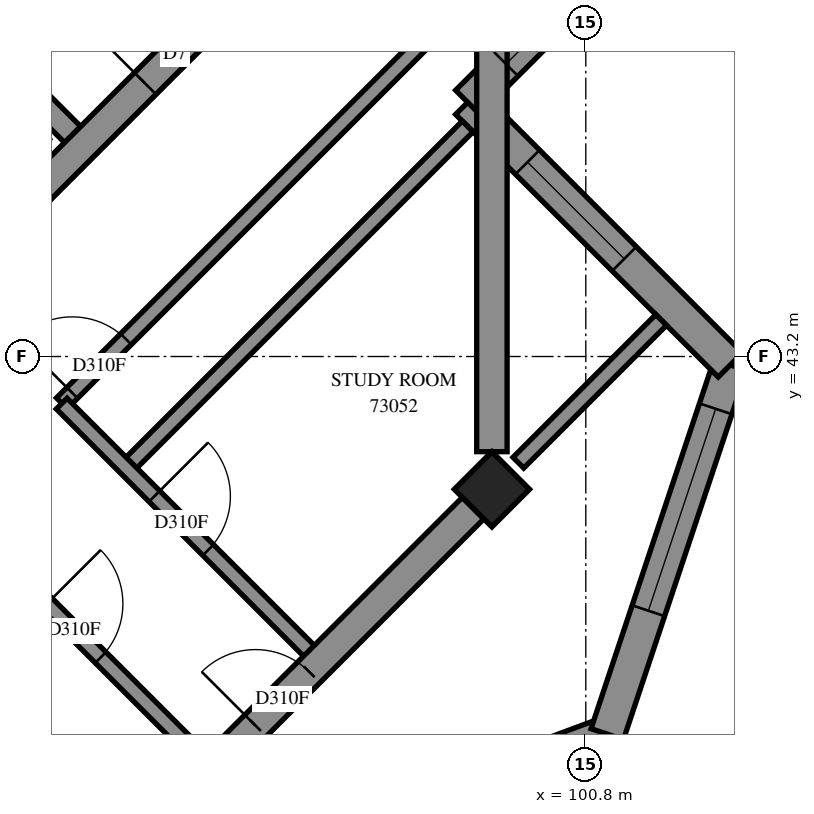
"""IFC4 building model, lengths in metres.
Left out: names, types, materials, properties, quantities, classifications, styles, units other than length and angle.
Written with IfcOpenShell. Run it as: python <this file> out.ifc"""

import sys

from ifc_helpers import new_model, si_unit, direction, frame, frame_2d, origin, origin_2d, place, context, subcontext, project, spatial, polyline, rectangle, outline, extrude, element, fill, save


model = new_model("IFC4")
c1 = context("Model", 3, precision=1e-05, world=origin(), true_north=direction((0.0, 1.0)))
c2 = subcontext(c1, "Body", "Model", "MODEL_VIEW")
j1 = project(units=[si_unit("LENGTHUNIT", "METRE"), si_unit("PLANEANGLEUNIT", "RADIAN")], contexts=[c1])
p1 = place(None, origin())
s1 = spatial("IfcSite", under=j1, at=p1, CompositionType="ELEMENT")
p2 = place(p1, origin())
s2 = spatial("IfcBuilding", under=s1, at=p2, CompositionType="ELEMENT")
p3 = place(p2, frame((0.0, 0.0, 267.6)))
s3 = spatial("IfcBuildingStorey", under=s2, at=p3, CompositionType="ELEMENT", Elevation=267.6)
p4 = place(p3, frame((99.565, 41.453, 0.0), z_axis=(0.0, 0.0, 1.0), x_axis=(0.7071067812, -0.7071067812, 0.0)))
e1 = element("IfcColumn", 1, at=p4, inside=s3, PredefinedType="COLUMN", context=c2, shape_type="SweptSolid", body=[
    extrude(rectangle(XDim=0.7, YDim=0.7, at=origin_2d()), origin(), (0.0, 0.0, 1.0), 3.1),
])
p5 = place(p3, frame((86.978, 38.766, -0.3), z_axis=(0.0, 0.0, 1.0), x_axis=(0.7071067812, 0.7071067812, 0.0)))
e2 = element("IfcWall", 2, at=p5, inside=s3, PredefinedType="SHEAR", context=c2, shape_type="SweptSolid", body=[
    extrude(rectangle(XDim=14.4, YDim=0.4, at=frame_2d((7.2, 0.0))), origin(), (0.0, 0.0, 1.0), 2.7),
])
p6 = place(p5, frame((4.55, 0.0, 0.3)))
e3 = element("IfcOpeningElement", 3, at=p6, cuts=e2, PredefinedType="OPENING", context=c2, shape_type="SweptSolid", body=[
    extrude(rectangle(XDim=1.1, YDim=2.1, at=frame_2d((0.55, 1.05))), frame((0.0, 0.21, 0.0), z_axis=(0.0, -1.0, 0.0), x_axis=(1.0, 0.0, 0.0)), (0.0, 0.0, 1.0), 0.42),
])
p7 = place(p5, frame((11.35, 0.0, 0.3)))
e4 = element("IfcOpeningElement", 4, at=p7, cuts=e2, PredefinedType="OPENING", context=c2, shape_type="SweptSolid", body=[
    extrude(rectangle(XDim=1.1, YDim=2.1, at=frame_2d((0.55, 1.05))), frame((0.0, 0.21, 0.0), z_axis=(0.0, -1.0, 0.0), x_axis=(1.0, 0.0, 0.0)), (0.0, 0.0, 1.0), 0.42),
])
p8 = place(p3, frame((88.958, 51.211, 0.0), z_axis=(0.0, 0.0, 1.0), x_axis=(0.7070998367, -0.7071137256, 0.0)))
e5 = element("IfcWall", 5, at=p8, inside=s3, PredefinedType="SOLIDWALL", context=c2, shape_type="SweptSolid", body=[
    extrude(rectangle(XDim=7.2, YDim=0.3, at=frame_2d((3.6, 0.0))), origin(), (0.0, 0.0, 1.0), 3.1),
])
p9 = place(p3, frame((96.137, 36.395, 0.0), z_axis=(0.0, 0.0, 1.0), x_axis=(0.937429161, 0.3481760591, 0.0)))
e6 = element("IfcWall", 6, at=p9, inside=s3, PredefinedType="SOLIDWALL", context=c2, shape_type="SweptSolid", body=[
    extrude(outline(polyline([(0.103, -0.225), (5.383, -0.225), (5.168, 0.225), (-0.103, 0.225), (0.103, -0.225)])), origin(), (0.0, 0.0, 1.0), 3.1),
])
p10 = place(p9, frame((1.651, 0.0, 0.45)))
e7 = element("IfcOpeningElement", 7, at=p10, cuts=e6, PredefinedType="OPENING", context=c2, shape_type="SweptSolid", body=[
    extrude(rectangle(XDim=2.8, YDim=2.55, at=frame_2d((1.4, 1.275))), frame((0.0, 0.235, 0.0), z_axis=(0.0, -1.0, 0.0), x_axis=(1.0, 0.0, 0.0)), (0.0, 0.0, 1.0), 0.47),
])
p11 = place(p3, frame((101.082, 38.232, 0.0), z_axis=(0.0, 0.0, 1.0), x_axis=(0.316227766, 0.9486832981, 0.0)))
e8 = element("IfcWall", 8, at=p11, inside=s3, PredefinedType="SOLIDWALL", context=c2, shape_type="SweptSolid", body=[
    extrude(outline(polyline([(-0.108, -0.225), (5.259, -0.225), (4.981, 0.225), (0.108, 0.225), (-0.108, -0.225)])), origin(), (0.0, 0.0, 1.0), 3.1),
])
p12 = place(p11, frame((1.711, 0.0, 0.45)))
e9 = element("IfcOpeningElement", 9, at=p12, cuts=e8, PredefinedType="OPENING", context=c2, shape_type="SweptSolid", body=[
    extrude(rectangle(XDim=2.8, YDim=2.55, at=frame_2d((1.4, 1.275))), frame((0.0, 0.235, 0.0), z_axis=(0.0, -1.0, 0.0), x_axis=(1.0, 0.0, 0.0)), (0.0, 0.0, 1.0), 0.47),
])
p13 = place(p3, frame((102.701, 43.089, 0.0), z_axis=(0.0, 0.0, 1.0), x_axis=(-0.7070965479, 0.7071170144, 0.0)))
e10 = element("IfcWall", 10, at=p13, inside=s3, PredefinedType="SOLIDWALL", context=c2, shape_type="SweptSolid", body=[
    extrude(outline(polyline([(-0.139, -0.225), (4.661, -0.225), (5.111, 0.225), (0.139, 0.225), (-0.139, -0.225)])), origin(), (0.0, 0.0, 1.0), 3.1),
])
p14 = place(p13, frame((1.974, 0.0, 0.6)))
e11 = element("IfcOpeningElement", 11, at=p14, cuts=e10, PredefinedType="OPENING", context=c2, shape_type="SweptSolid", body=[
    extrude(rectangle(XDim=1.8, YDim=1.9, at=frame_2d((0.9, 0.95))), frame((0.0, 0.235, 0.0), z_axis=(0.0, -1.0, 0.0), x_axis=(1.0, 0.0, 0.0)), (0.0, 0.0, 1.0), 0.47),
])
p15 = place(p3, frame((99.246, 46.544, 0.0), z_axis=(0.0, 0.0, 1.0), x_axis=(0.7071067812, 0.7071067812, 0.0)))
e12 = element("IfcWall", 12, at=p15, inside=s3, PredefinedType="SOLIDWALL", context=c2, shape_type="SweptSolid", body=[
    extrude(outline(polyline([(0.225, -0.225), (6.137, -0.225), (5.513, 0.225), (-0.225, 0.225), (0.225, -0.225)])), origin(), (0.0, 0.0, 1.0), 3.1),
])
p16 = place(p15, frame((0.713, 0.0, 0.6)))
e13 = element("IfcOpeningElement", 13, at=p16, cuts=e12, PredefinedType="OPENING", context=c2, shape_type="SweptSolid", body=[
    extrude(rectangle(XDim=1.8, YDim=1.9, at=frame_2d((0.9, 0.95))), frame((0.0, 0.235, 0.0), z_axis=(0.0, -1.0, 0.0), x_axis=(1.0, 0.0, 0.0)), (0.0, 0.0, 1.0), 0.47),
])
p17 = place(p15, frame((3.969, 0.0, 0.6)))
e14 = element("IfcOpeningElement", 14, at=p17, cuts=e12, PredefinedType="OPENING", context=c2, shape_type="SweptSolid", body=[
    extrude(rectangle(XDim=1.2, YDim=1.9, at=frame_2d((0.6, 0.95))), frame((0.0, 0.235, 0.0), z_axis=(0.0, -1.0, 0.0), x_axis=(1.0, 0.0, 0.0)), (0.0, 0.0, 1.0), 0.47),
])
p18 = place(p3, frame((93.907, 42.585, 0.0), z_axis=(0.0, 0.0, 1.0), x_axis=(0.7071067812, 0.7071067812, 0.0)))
e15 = element("IfcWall", 15, at=p18, inside=s3, PredefinedType="PARTITIONING", context=c2, shape_type="SweptSolid", body=[
    extrude(rectangle(XDim=9.201, YDim=0.2, at=frame_2d((4.601, 0.0))), origin(), (0.0, 0.0, 1.0), 3.1),
])
p19 = place(p18, frame((0.193, 0.0, 0.0)))
e16 = element("IfcOpeningElement", 16, at=p19, cuts=e15, PredefinedType="OPENING", context=c2, shape_type="SweptSolid", body=[
    extrude(rectangle(XDim=1.0, YDim=2.1, at=frame_2d((0.5, 1.05))), frame((0.0, 0.11, 0.0), z_axis=(0.0, -1.0, 0.0), x_axis=(1.0, 0.0, 0.0)), (0.0, 0.0, 1.0), 0.22),
])
p20 = place(p3, frame((94.755, 41.737, 0.0), z_axis=(0.0, 0.0, 1.0), x_axis=(0.7071146549, 0.7070989073, 0.0)))
e17 = element("IfcWall", 17, at=p20, inside=s3, PredefinedType="PARTITIONING", context=c2, shape_type="SweptSolid", body=[
    extrude(rectangle(XDim=6.35, YDim=0.2, at=frame_2d((3.175, 0.0))), origin(), (0.0, 0.0, 1.0), 3.1),
])
p21 = place(p3, frame((93.905, 42.581, 0.0), z_axis=(0.0, 0.0, 1.0), x_axis=(0.7071067812, -0.7071067812, 0.0)))
e18 = element("IfcWall", 18, at=p21, inside=s3, PredefinedType="PARTITIONING", context=c2, shape_type="SweptSolid", body=[
    extrude(rectangle(XDim=4.8, YDim=0.2, at=frame_2d((2.4, 0.0))), origin(), (0.0, 0.0, 1.0), 3.1),
])
p22 = place(p21, frame((1.725, 0.0, 0.0)))
e19 = element("IfcOpeningElement", 19, at=p22, cuts=e18, PredefinedType="OPENING", context=c2, shape_type="SweptSolid", body=[
    extrude(rectangle(XDim=1.0, YDim=2.1, at=frame_2d((0.5, 1.05))), frame((0.0, 0.11, 0.0), z_axis=(0.0, -1.0, 0.0), x_axis=(1.0, 0.0, 0.0)), (0.0, 0.0, 1.0), 0.22),
])
p23 = place(p3, frame((92.491, 41.167, 0.0), z_axis=(0.0, 0.0, 1.0), x_axis=(0.7071067812, -0.7071067812, 0.0)))
e20 = element("IfcWall", 20, at=p23, inside=s3, PredefinedType="PARTITIONING", context=c2, shape_type="SweptSolid", body=[
    extrude(rectangle(XDim=4.8, YDim=0.2, at=frame_2d((2.4, 0.0))), origin(), (0.0, 0.0, 1.0), 3.1),
])
p24 = place(p23, frame((1.725, 0.0, 0.0)))
e21 = element("IfcOpeningElement", 21, at=p24, cuts=e20, PredefinedType="OPENING", context=c2, shape_type="SweptSolid", body=[
    extrude(rectangle(XDim=1.0, YDim=2.1, at=frame_2d((0.5, 1.05))), frame((0.0, 0.11, 0.0), z_axis=(0.0, -1.0, 0.0), x_axis=(1.0, 0.0, 0.0)), (0.0, 0.0, 1.0), 0.22),
])
p25 = place(p3, frame((97.301, 39.191, 0.0), z_axis=(0.0, 0.0, 1.0), x_axis=(0.7071067812, 0.7071067812, 0.0)))
e22 = element("IfcWall", 22, at=p25, inside=s3, PredefinedType="PARTITIONING", context=c2, shape_type="SweptSolid", body=[
    extrude(rectangle(XDim=2.707, YDim=0.2, at=frame_2d((1.353, 0.0))), origin(), (0.0, 0.0, 1.0), 2.6),
])
p26 = place(p3, frame((99.913, 41.803, 0.0), z_axis=(0.0, 0.0, 1.0), x_axis=(0.7071067812, 0.7071067812, 0.0)))
e23 = element("IfcWall", 23, at=p26, inside=s3, PredefinedType="PARTITIONING", context=c2, shape_type="SweptSolid", body=[
    extrude(rectangle(XDim=2.656, YDim=0.2, at=frame_2d((1.328, 0.0))), origin(), (0.0, 0.0, 1.0), 3.1),
])
p27 = place(p3, frame((95.887, 37.777, 0.0), z_axis=(0.0, 0.0, 1.0), x_axis=(0.7071067812, 0.7071067812, 0.0)))
e24 = element("IfcWall", 24, at=p27, inside=s3, PredefinedType="PARTITIONING", context=c2, shape_type="SweptSolid", body=[
    extrude(rectangle(XDim=2.0, YDim=0.2, at=frame_2d((1.0, 0.0))), origin(), (0.0, 0.0, 1.0), 2.6),
])
p28 = place(p27, frame((0.803, 0.0, 0.0)))
e25 = element("IfcOpeningElement", 25, at=p28, cuts=e24, PredefinedType="OPENING", context=c2, shape_type="SweptSolid", body=[
    extrude(rectangle(XDim=1.0, YDim=2.1, at=frame_2d((0.5, 1.05))), frame((0.0, 0.11, 0.0), z_axis=(0.0, -1.0, 0.0), x_axis=(1.0, 0.0, 0.0)), (0.0, 0.0, 1.0), 0.22),
])
p29 = place(p12, origin())
e26 = element("IfcWindow", 26, at=p29, inside=s3, PartitioningType="SINGLE_PANEL", PredefinedType="WINDOW", context=c2, shape_type="SweptSolid", body=[
    extrude(rectangle(XDim=2.8, YDim=2.55, at=frame_2d((1.4, 1.275))), frame((0.0, 0.205, 0.0), z_axis=(0.0, -1.0, 0.0), x_axis=(1.0, 0.0, 0.0)), (0.0, 0.0, 1.0), 0.06),
])
fill(e9, e26)
p30 = place(p14, origin())
e27 = element("IfcWindow", 27, at=p30, inside=s3, PartitioningType="SINGLE_PANEL", PredefinedType="WINDOW", context=c2, shape_type="SweptSolid", body=[
    extrude(rectangle(XDim=1.8, YDim=1.9, at=frame_2d((0.9, 0.95))), frame((0.0, 0.205, 0.0), z_axis=(0.0, -1.0, 0.0), x_axis=(1.0, 0.0, 0.0)), (0.0, 0.0, 1.0), 0.06),
])
fill(e11, e27)
p31 = place(p16, origin())
e28 = element("IfcWindow", 28, at=p31, inside=s3, PartitioningType="SINGLE_PANEL", PredefinedType="WINDOW", context=c2, shape_type="SweptSolid", body=[
    extrude(rectangle(XDim=1.8, YDim=1.9, at=frame_2d((0.9, 0.95))), frame((0.0, 0.205, 0.0), z_axis=(0.0, -1.0, 0.0), x_axis=(1.0, 0.0, 0.0)), (0.0, 0.0, 1.0), 0.06),
])
fill(e13, e28)
p32 = place(p7, origin())
e29 = element("IfcDoor", 29, at=p32, inside=s3, OperationType="SINGLE_SWING_RIGHT", PredefinedType="DOOR", context=c2, shape_type="SweptSolid", body=[
    extrude(rectangle(XDim=1.1, YDim=2.1, at=frame_2d((0.55, 1.05))), frame((0.0, 0.025, 0.0), z_axis=(0.0, -1.0, 0.0), x_axis=(1.0, 0.0, 0.0)), (0.0, 0.0, 1.0), 0.05),
])
fill(e4, e29)
p33 = place(p19, origin())
e30 = element("IfcDoor", 30, at=p33, inside=s3, OperationType="SINGLE_SWING_LEFT", PredefinedType="DOOR", context=c2, shape_type="SweptSolid", body=[
    extrude(rectangle(XDim=1.0, YDim=2.1, at=frame_2d((0.5, 1.05))), frame((0.0, 0.025, 0.0), z_axis=(0.0, -1.0, 0.0), x_axis=(1.0, 0.0, 0.0)), (0.0, 0.0, 1.0), 0.05),
])
fill(e16, e30)
p34 = place(p24, origin())
e31 = element("IfcDoor", 31, at=p34, inside=s3, OperationType="SINGLE_SWING_LEFT", PredefinedType="DOOR", context=c2, shape_type="SweptSolid", body=[
    extrude(rectangle(XDim=1.0, YDim=2.1, at=frame_2d((0.5, 1.05))), frame((0.0, 0.025, 0.0), z_axis=(0.0, -1.0, 0.0), x_axis=(1.0, 0.0, 0.0)), (0.0, 0.0, 1.0), 0.05),
])
fill(e21, e31)
p35 = place(p22, origin())
e32 = element("IfcDoor", 32, at=p35, inside=s3, OperationType="SINGLE_SWING_RIGHT", PredefinedType="DOOR", context=c2, shape_type="SweptSolid", body=[
    extrude(rectangle(XDim=1.0, YDim=2.1, at=frame_2d((0.5, 1.05))), frame((0.0, 0.025, 0.0), z_axis=(0.0, -1.0, 0.0), x_axis=(1.0, 0.0, 0.0)), (0.0, 0.0, 1.0), 0.05),
])
fill(e19, e32)
p36 = place(p28, origin())
e33 = element("IfcDoor", 33, at=p36, inside=s3, OperationType="SINGLE_SWING_RIGHT", PredefinedType="DOOR", context=c2, shape_type="SweptSolid", body=[
    extrude(rectangle(XDim=1.0, YDim=2.1, at=frame_2d((0.5, 1.05))), frame((0.0, 0.025, 0.0), z_axis=(0.0, -1.0, 0.0), x_axis=(1.0, 0.0, 0.0)), (0.0, 0.0, 1.0), 0.05),
])
fill(e25, e33)
save(model, sys.argv[1])
